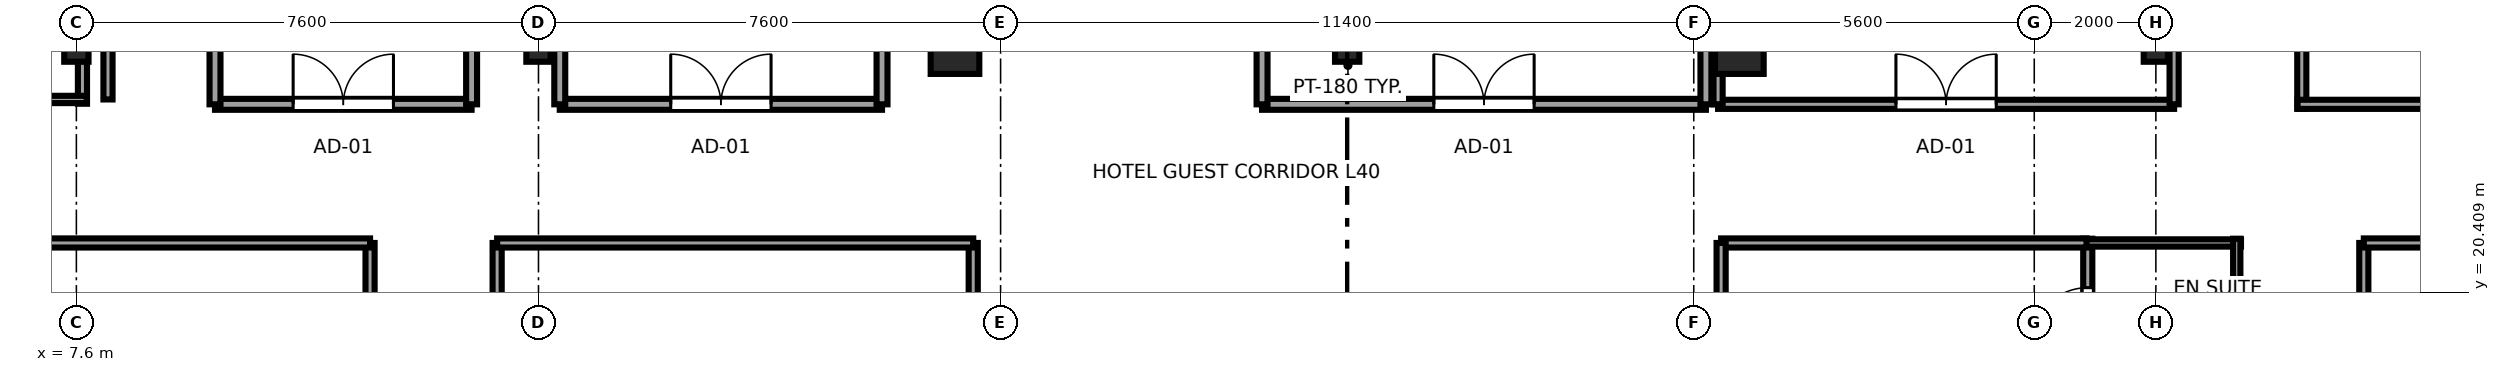
"""IFC4 building model, lengths in metres.
Left out: names, types, materials, properties, quantities, classifications, styles, units other than length and angle.
Written with IfcOpenShell. Run it as: python <this file> out.ifc"""

import sys

from ifc_helpers import new_model, si_unit, direction, frame, frame_2d, origin, origin_2d, place, context, subcontext, project, spatial, rectangle, i_section, extrude, source, transform, mapped, element, fill, save


model = new_model("IFC4")
c1 = context("Model", 3, precision=1e-05, world=origin(), true_north=direction((0.0, 1.0)))
c2 = subcontext(c1, "Body", "Model", "MODEL_VIEW")
j1 = project(units=[si_unit("LENGTHUNIT", "METRE"), si_unit("PLANEANGLEUNIT", "RADIAN")], contexts=[c1])
p1 = place(None, origin())
s1 = spatial("IfcSite", under=j1, at=p1, CompositionType="ELEMENT")
p2 = place(p1, origin())
s2 = spatial("IfcBuilding", under=s1, at=p2, CompositionType="ELEMENT")
p3 = place(p2, frame((0.0, 0.0, 154.15)))
s3 = spatial("IfcBuildingStorey", under=s2, at=p3, CompositionType="ELEMENT", Elevation=154.15)
m1 = source(origin(), c2, "Body", "SweptSolid", [
    extrude(i_section(OverallWidth=0.4, OverallDepth=0.4, WebThickness=0.02, FlangeThickness=0.035, at=origin_2d()), origin(), (0.0, 0.0, 1.0), 3.55),
])
for number, where, z_axis, x_axis in (
    (1, (7.6, 24.4, 0.0), (0.0, 0.0, 1.0), (1.0, 0.0, 0.0)),
    (2, (15.2, 24.4, 0.0), (0.0, 0.0, 1.0), (1.0, 0.0, 0.0)),
):
    element("IfcColumn", number, at=place(p3, frame(where, z_axis=z_axis, x_axis=x_axis)), inside=s3, PredefinedType="COLUMN", context=c2, shape_type="MappedRepresentation", body=[
        mapped(m1, transform((0.0, 0.0, 0.0), x_axis=(1.0, 0.0, 0.0), y_axis=(0.0, 1.0, 0.0), z_axis=(0.0, 0.0, 1.0), scale=1.0)),
    ])
m2 = source(origin(), c2, "Body", "SweptSolid", [
    extrude(rectangle(XDim=0.8, YDim=0.8, at=origin_2d()), origin(), (0.0, 0.0, 1.0), 3.55),
])
for number, where, z_axis, x_axis in (
    (3, (22.05, 24.4, 0.0), (0.0, 0.0, 1.0), (1.0, 0.0, 0.0)),
    (4, (34.95, 24.4, 0.0), (0.0, 0.0, 1.0), (1.0, 0.0, 0.0)),
):
    element("IfcColumn", number, at=place(p3, frame(where, z_axis=z_axis, x_axis=x_axis)), inside=s3, PredefinedType="COLUMN", context=c2, shape_type="MappedRepresentation", body=[
        mapped(m2, transform((0.0, 0.0, 0.0), x_axis=(1.0, 0.0, 0.0), y_axis=(0.0, 1.0, 0.0), z_axis=(0.0, 0.0, 1.0), scale=1.0)),
    ])
for number, where, z_axis, x_axis in (
    (5, (41.8, 24.4, 0.0), (0.0, 0.0, 1.0), (1.0, 0.0, 0.0)),
    (6, (28.5, 24.4, 0.0), (0.0, 0.0, 1.0), (1.0, 0.0, 0.0)),
):
    element("IfcColumn", number, at=place(p3, frame(where, z_axis=z_axis, x_axis=x_axis)), inside=s3, PredefinedType="COLUMN", context=c2, shape_type="MappedRepresentation", body=[
        mapped(m1, transform((0.0, 0.0, 0.0), x_axis=(1.0, 0.0, 0.0), y_axis=(0.0, 1.0, 0.0), z_axis=(0.0, 0.0, 1.0), scale=1.0)),
    ])
p4 = place(p3, frame((40.68, 18.9, 0.0), z_axis=(0.0, 0.0, 1.0), x_axis=(0.0, 1.0, 0.0)))
e7 = element("IfcWall", 7, at=p4, inside=s3, PredefinedType="PARTITIONING", context=c2, shape_type="SweptSolid", body=[
    extrude(rectangle(XDim=2.39, YDim=0.15, at=frame_2d((1.195, 0.0))), origin(), (0.0, 0.0, 1.0), 3.37),
])
p5 = place(p4, frame((0.665, 0.0, 0.0)))
e8 = element("IfcOpeningElement", 8, at=p5, cuts=e7, PredefinedType="OPENING", context=c2, shape_type="SweptSolid", body=[
    extrude(rectangle(XDim=0.92, YDim=2.01, at=frame_2d((0.46, 1.005))), frame((0.0, 0.085, 0.0), z_axis=(0.0, -1.0, 0.0), x_axis=(1.0, 0.0, 0.0)), (0.0, 0.0, 1.0), 0.17),
])
p6 = place(p3, frame((40.61, 21.22, 0.0), z_axis=(0.0, 0.0, 1.0), x_axis=(1.0, 0.0, 0.0)))
e9 = element("IfcWall", 9, at=p6, inside=s3, PredefinedType="PLUMBINGWALL", context=c2, shape_type="SweptSolid", body=[
    extrude(rectangle(XDim=2.59, YDim=0.12, at=frame_2d((1.295, 0.0))), origin(), (0.0, 0.0, 1.0), 3.37),
])
p7 = place(p3, frame((43.13, 18.9, 0.0), z_axis=(0.0, 0.0, 1.0), x_axis=(0.0, 1.0, 0.0)))
e10 = element("IfcWall", 10, at=p7, inside=s3, PredefinedType="PLUMBINGWALL", context=c2, shape_type="SweptSolid", body=[
    extrude(rectangle(XDim=2.39, YDim=0.12, at=frame_2d((1.195, 0.0))), origin(), (0.0, 0.0, 1.0), 3.37),
])
p8 = place(p3, frame((7.7, 23.51, 0.0), z_axis=(0.0, 0.0, 1.0), x_axis=(0.0, 1.0, 0.0)))
e11 = element("IfcWall", 11, at=p8, inside=s3, PredefinedType="PARTITIONING", context=c2, shape_type="SweptSolid", body=[
    extrude(rectangle(XDim=2.39, YDim=0.15, at=frame_2d((1.195, 0.0))), origin(), (0.0, 0.0, 1.0), 2.16),
])
p9 = place(p3, frame((5.48, 23.58, 0.0), z_axis=(0.0, 0.0, 1.0), x_axis=(1.0, 0.0, 0.0)))
e12 = element("IfcWall", 12, at=p9, inside=s3, PredefinedType="PLUMBINGWALL", context=c2, shape_type="SweptSolid", body=[
    extrude(rectangle(XDim=2.29, YDim=0.12, at=frame_2d((1.145, 0.0))), origin(), (0.0, 0.0, 1.0), 3.37),
])
p10 = place(p3, frame((12.43, 18.61, 0.0), z_axis=(0.0, 0.0, 1.0), x_axis=(0.0, 1.0, 0.0)))
e13 = element("IfcWall", 13, at=p10, inside=s3, PredefinedType="PARTITIONING", context=c2, shape_type="SweptSolid", body=[
    extrude(rectangle(XDim=2.61, YDim=0.15, at=frame_2d((1.305, 0.0))), origin(), (0.0, 0.0, 1.0), 3.37),
])
p11 = place(p10, frame((0.795, 0.0, 0.0)))
e14 = element("IfcOpeningElement", 14, at=p11, cuts=e13, PredefinedType="OPENING", context=c2, shape_type="SweptSolid", body=[
    extrude(rectangle(XDim=0.98, YDim=2.12, at=frame_2d((0.49, 1.06))), frame((0.0, 0.085, 0.0), z_axis=(0.0, -1.0, 0.0), x_axis=(1.0, 0.0, 0.0)), (0.0, 0.0, 1.0), 0.17),
])
p12 = place(p3, frame((2.9, 21.22, 0.0), z_axis=(0.0, 0.0, 1.0), x_axis=(1.0, 0.0, 0.0)))
e15 = element("IfcWall", 15, at=p12, inside=s3, PredefinedType="PARTITIONING", context=c2, shape_type="SweptSolid", body=[
    extrude(rectangle(XDim=9.53, YDim=0.15, at=frame_2d((4.765, 0.0))), origin(), (0.0, 0.0, 1.0), 3.37),
])
p13 = place(p3, frame((14.52, 14.61, 0.0), z_axis=(0.0, 0.0, 1.0), x_axis=(0.0, 1.0, 0.0)))
e16 = element("IfcWall", 16, at=p13, inside=s3, PredefinedType="PARTITIONING", context=c2, shape_type="SweptSolid", body=[
    extrude(rectangle(XDim=6.61, YDim=0.15, at=frame_2d((3.305, 0.0))), origin(), (0.0, 0.0, 1.0), 3.37),
])
p14 = place(p13, frame((2.795, 0.0, 0.0)))
e17 = element("IfcOpeningElement", 17, at=p14, cuts=e16, PredefinedType="OPENING", context=c2, shape_type="SweptSolid", body=[
    extrude(rectangle(XDim=0.98, YDim=2.12, at=frame_2d((0.49, 1.06))), frame((0.0, 0.085, 0.0), z_axis=(0.0, -1.0, 0.0), x_axis=(1.0, 0.0, 0.0)), (0.0, 0.0, 1.0), 0.17),
])
p15 = place(p3, frame((22.35, 12.28, 0.0), z_axis=(0.0, 0.0, 1.0), x_axis=(0.0, 1.0, 0.0)))
e18 = element("IfcWall", 18, at=p15, inside=s3, PredefinedType="PARTITIONING", context=c2, shape_type="SweptSolid", body=[
    extrude(rectangle(XDim=8.94, YDim=0.15, at=frame_2d((4.47, 0.0))), origin(), (0.0, 0.0, 1.0), 3.37),
])
p16 = place(p3, frame((14.52, 21.22, 0.0), z_axis=(0.0, 0.0, 1.0), x_axis=(1.0, 0.0, 0.0)))
e19 = element("IfcWall", 19, at=p16, inside=s3, PredefinedType="PARTITIONING", context=c2, shape_type="SweptSolid", body=[
    extrude(rectangle(XDim=7.83, YDim=0.15, at=frame_2d((3.915, 0.0))), origin(), (0.0, 0.0, 1.0), 3.37),
])
p17 = place(p3, frame((34.65, 21.22, 0.0), z_axis=(0.0, 0.0, 1.0), x_axis=(1.0, 0.0, 0.0)))
e20 = element("IfcWall", 20, at=p17, inside=s3, PredefinedType="PARTITIONING", context=c2, shape_type="SweptSolid", body=[
    extrude(rectangle(XDim=6.01, YDim=0.15, at=frame_2d((3.005, 0.0))), origin(), (0.0, 0.0, 1.0), 3.37),
])
p18 = place(p3, frame((34.65, 15.28, 0.0), z_axis=(0.0, 0.0, 1.0), x_axis=(0.0, 1.0, 0.0)))
e21 = element("IfcWall", 21, at=p18, inside=s3, PredefinedType="PARTITIONING", context=c2, shape_type="SweptSolid", body=[
    extrude(rectangle(XDim=5.94, YDim=0.15, at=frame_2d((2.97, 0.0))), origin(), (0.0, 0.0, 1.0), 3.37),
])
p19 = place(p3, frame((45.22, 18.61, 0.0), z_axis=(0.0, 0.0, 1.0), x_axis=(0.0, 1.0, 0.0)))
e22 = element("IfcWall", 22, at=p19, inside=s3, PredefinedType="PARTITIONING", context=c2, shape_type="SweptSolid", body=[
    extrude(rectangle(XDim=2.61, YDim=0.15, at=frame_2d((1.305, 0.0))), origin(), (0.0, 0.0, 1.0), 3.37),
])
p20 = place(p19, frame((0.795, 0.0, 0.0)))
e23 = element("IfcOpeningElement", 23, at=p20, cuts=e22, PredefinedType="OPENING", context=c2, shape_type="SweptSolid", body=[
    extrude(rectangle(XDim=0.98, YDim=2.12, at=frame_2d((0.49, 1.06))), frame((0.0, 0.085, 0.0), z_axis=(0.0, -1.0, 0.0), x_axis=(1.0, 0.0, 0.0)), (0.0, 0.0, 1.0), 0.17),
])
p21 = place(p3, frame((45.22, 21.22, 0.0), z_axis=(0.0, 0.0, 1.0), x_axis=(1.0, 0.0, 0.0)))
e24 = element("IfcWall", 24, at=p21, inside=s3, PredefinedType="PARTITIONING", context=c2, shape_type="SweptSolid", body=[
    extrude(rectangle(XDim=8.775, YDim=0.15, at=frame_2d((4.388, 0.0))), origin(), (0.0, 0.0, 1.0), 3.37),
])
p22 = place(p3, frame((8.12, 23.58, 0.0), z_axis=(0.0, 0.0, 1.0), x_axis=(0.0, 1.0, 0.0)))
e25 = element("IfcWall", 25, at=p22, inside=s3, PredefinedType="PARTITIONING", context=c2, shape_type="SweptSolid", body=[
    extrude(rectangle(XDim=10.74, YDim=0.15, at=frame_2d((5.37, 0.0))), origin(), (0.0, 0.0, 1.0), 3.37),
])
p23 = place(p22, frame((4.88, 0.0, 0.0)))
e26 = element("IfcOpeningElement", 26, at=p23, cuts=e25, PredefinedType="OPENING", context=c2, shape_type="SweptSolid", body=[
    extrude(rectangle(XDim=0.98, YDim=2.12, at=frame_2d((0.49, 1.06))), frame((0.0, 0.085, 0.0), z_axis=(0.0, -1.0, 0.0), x_axis=(1.0, 0.0, 0.0)), (0.0, 0.0, 1.0), 0.17),
])
p24 = place(p3, frame((44.2, 23.43, 0.0), z_axis=(0.0, 0.0, 1.0), x_axis=(0.0, 1.0, 0.0)))
e27 = element("IfcWall", 27, at=p24, inside=s3, PredefinedType="PARTITIONING", context=c2, shape_type="SweptSolid", body=[
    extrude(rectangle(XDim=3.74, YDim=0.15, at=frame_2d((1.87, 0.0))), origin(), (0.0, 0.0, 1.0), 3.37),
])
p25 = place(p24, frame((1.24, 0.0, 0.0)))
e28 = element("IfcOpeningElement", 28, at=p25, cuts=e27, PredefinedType="OPENING", context=c2, shape_type="SweptSolid", body=[
    extrude(rectangle(XDim=0.92, YDim=2.01, at=frame_2d((0.46, 1.005))), frame((0.0, 0.085, 0.0), z_axis=(0.0, -1.0, 0.0), x_axis=(1.0, 0.0, 0.0)), (0.0, 0.0, 1.0), 0.17),
])
p26 = place(p3, frame((44.13, 23.5, 0.0), z_axis=(0.0, 0.0, 1.0), x_axis=(1.0, 0.0, 0.0)))
e29 = element("IfcWall", 29, at=p26, inside=s3, PredefinedType="PARTITIONING", context=c2, shape_type="SweptSolid", body=[
    extrude(rectangle(XDim=4.54, YDim=0.15, at=frame_2d((2.27, 0.0))), origin(), (0.0, 0.0, 1.0), 3.37),
])
p27 = place(p3, frame((9.88, 23.5, 0.0), z_axis=(0.0, 0.0, 1.0), x_axis=(1.0, 0.0, 0.0)))
e30 = element("IfcWall", 30, at=p27, inside=s3, PredefinedType="PARTITIONING", context=c2, shape_type="SweptSolid", body=[
    extrude(rectangle(XDim=4.22, YDim=0.18, at=frame_2d((2.11, 0.0))), origin(), (0.0, 0.0, 1.0), 3.37),
])
p28 = place(p27, frame((1.285, 0.0, 0.0)))
e31 = element("IfcOpeningElement", 31, at=p28, cuts=e30, PredefinedType="OPENING", context=c2, shape_type="SweptSolid", body=[
    extrude(rectangle(XDim=1.65, YDim=2.15, at=frame_2d((0.825, 1.075))), frame((0.0, 0.1, 0.0), z_axis=(0.0, -1.0, 0.0), x_axis=(1.0, 0.0, 0.0)), (0.0, 0.0, 1.0), 0.2),
])
for number, where, z_axis, x_axis in (
    (32, (9.88, 23.5, 0.0), (0.0, 0.0, 1.0), (0.0, 1.0, 0.0)),
    (33, (14.1, 23.5, 0.0), (0.0, 0.0, 1.0), (0.0, 1.0, 0.0)),
):
    element("IfcWall", number, at=place(p3, frame(where, z_axis=z_axis, x_axis=x_axis)), inside=s3, PredefinedType="PARTITIONING", context=c2, shape_type="SweptSolid", body=[
        extrude(rectangle(XDim=6.25, YDim=0.18, at=frame_2d((3.125, 0.0))), origin(), (0.0, 0.0, 1.0), 3.37),
    ])
p29 = place(p3, frame((27.1, 23.5, 0.0), z_axis=(0.0, 0.0, 1.0), x_axis=(1.0, 0.0, 0.0)))
e34 = element("IfcWall", 34, at=p29, inside=s3, PredefinedType="PARTITIONING", context=c2, shape_type="SweptSolid", body=[
    extrude(rectangle(XDim=7.3, YDim=0.18, at=frame_2d((3.65, 0.0))), origin(), (0.0, 0.0, 1.0), 3.37),
])
p30 = place(p29, frame((2.825, 0.0, 0.0)))
e35 = element("IfcOpeningElement", 35, at=p30, cuts=e34, PredefinedType="OPENING", context=c2, shape_type="SweptSolid", body=[
    extrude(rectangle(XDim=1.65, YDim=2.15, at=frame_2d((0.825, 1.075))), frame((0.0, 0.1, 0.0), z_axis=(0.0, -1.0, 0.0), x_axis=(1.0, 0.0, 0.0)), (0.0, 0.0, 1.0), 0.2),
])
for number, where, z_axis, x_axis in (
    (36, (27.1, 23.5, 0.0), (0.0, 0.0, 1.0), (0.0, 1.0, 0.0)),
    (37, (34.4, 23.5, 0.0), (0.0, 0.0, 1.0), (0.0, 1.0, 0.0)),
):
    element("IfcWall", number, at=place(p3, frame(where, z_axis=z_axis, x_axis=x_axis)), inside=s3, PredefinedType="PARTITIONING", context=c2, shape_type="SweptSolid", body=[
        extrude(rectangle(XDim=6.3, YDim=0.18, at=frame_2d((3.15, 0.0))), origin(), (0.0, 0.0, 1.0), 3.37),
    ])
p31 = place(p3, frame((15.55, 23.5, 0.0), z_axis=(0.0, 0.0, 1.0), x_axis=(1.0, 0.0, 0.0)))
e38 = element("IfcWall", 38, at=p31, inside=s3, PredefinedType="PARTITIONING", context=c2, shape_type="SweptSolid", body=[
    extrude(rectangle(XDim=5.3, YDim=0.18, at=frame_2d((2.65, 0.0))), origin(), (0.0, 0.0, 1.0), 3.37),
])
p32 = place(p31, frame((1.825, 0.0, 0.0)))
e39 = element("IfcOpeningElement", 39, at=p32, cuts=e38, PredefinedType="OPENING", context=c2, shape_type="SweptSolid", body=[
    extrude(rectangle(XDim=1.65, YDim=2.15, at=frame_2d((0.825, 1.075))), frame((0.0, 0.1, 0.0), z_axis=(0.0, -1.0, 0.0), x_axis=(1.0, 0.0, 0.0)), (0.0, 0.0, 1.0), 0.2),
])
for number, where, z_axis, x_axis in (
    (40, (15.55, 23.5, 0.0), (0.0, 0.0, 1.0), (0.0, 1.0, 0.0)),
    (41, (20.85, 23.5, 0.0), (0.0, 0.0, 1.0), (0.0, 1.0, 0.0)),
):
    element("IfcWall", number, at=place(p3, frame(where, z_axis=z_axis, x_axis=x_axis)), inside=s3, PredefinedType="PARTITIONING", context=c2, shape_type="SweptSolid", body=[
        extrude(rectangle(XDim=6.3, YDim=0.18, at=frame_2d((3.15, 0.0))), origin(), (0.0, 0.0, 1.0), 3.37),
    ])
p33 = place(p3, frame((34.6, 23.5, 0.0), z_axis=(0.0, 0.0, 1.0), x_axis=(1.0, 0.0, 0.0)))
e42 = element("IfcWall", 42, at=p33, inside=s3, PredefinedType="PARTITIONING", context=c2, shape_type="SweptSolid", body=[
    extrude(rectangle(XDim=7.5, YDim=0.15, at=frame_2d((3.75, 0.0))), origin(), (0.0, 0.0, 1.0), 3.37),
])
p34 = place(p33, frame((2.925, 0.0, 0.0)))
e43 = element("IfcOpeningElement", 43, at=p34, cuts=e42, PredefinedType="OPENING", context=c2, shape_type="SweptSolid", body=[
    extrude(rectangle(XDim=1.65, YDim=2.15, at=frame_2d((0.825, 1.075))), frame((0.0, 0.085, 0.0), z_axis=(0.0, -1.0, 0.0), x_axis=(1.0, 0.0, 0.0)), (0.0, 0.0, 1.0), 0.17),
])
p35 = place(p3, frame((34.6, 23.5, 0.0), z_axis=(0.0, 0.0, 1.0), x_axis=(0.0, 1.0, 0.0)))
e44 = element("IfcWall", 44, at=p35, inside=s3, PredefinedType="PARTITIONING", context=c2, shape_type="SweptSolid", body=[
    extrude(rectangle(XDim=5.9, YDim=0.15, at=frame_2d((2.95, 0.0))), origin(), (0.0, 0.0, 1.0), 3.37),
])
p36 = place(p3, frame((42.1, 23.5, 0.0), z_axis=(0.0, 0.0, 1.0), x_axis=(0.0, 1.0, 0.0)))
e45 = element("IfcWall", 45, at=p36, inside=s3, PredefinedType="PARTITIONING", context=c2, shape_type="SweptSolid", body=[
    extrude(rectangle(XDim=5.9, YDim=0.15, at=frame_2d((2.95, 0.0))), origin(), (0.0, 0.0, 1.0), 2.16),
])
m3 = source(origin(), c2, "Body", "SweptSolid", [
    extrude(rectangle(XDim=0.92, YDim=2.01, at=frame_2d((0.46, 1.005))), frame((0.0, 0.025, 0.0), z_axis=(0.0, -1.0, 0.0), x_axis=(1.0, 0.0, 0.0)), (0.0, 0.0, 1.0), 0.05),
])
p37 = place(p5, origin())
e46 = element("IfcDoor", 46, at=p37, inside=s3, OperationType="SINGLE_SWING_LEFT", PredefinedType="DOOR", context=c2, shape_type="MappedRepresentation", body=[
    mapped(m3, transform((0.0, 0.0, 0.0), x_axis=(1.0, 0.0, 0.0), y_axis=(0.0, 1.0, 0.0), z_axis=(0.0, 0.0, 1.0), scale=1.0)),
])
fill(e8, e46)
m4 = source(origin(), c2, "Body", "SweptSolid", [
    extrude(rectangle(XDim=1.65, YDim=2.15, at=frame_2d((0.825, 1.075))), frame((0.0, 0.025, 0.0), z_axis=(0.0, -1.0, 0.0), x_axis=(1.0, 0.0, 0.0)), (0.0, 0.0, 1.0), 0.05),
])
p38 = place(p28, origin())
e47 = element("IfcDoor", 47, at=p38, inside=s3, OperationType="DOUBLE_DOOR_SINGLE_SWING", PredefinedType="DOOR", context=c2, shape_type="MappedRepresentation", body=[
    mapped(m4, transform((0.0, 0.0, 0.0), x_axis=(1.0, 0.0, 0.0), y_axis=(0.0, 1.0, 0.0), z_axis=(0.0, 0.0, 1.0), scale=1.0)),
])
fill(e31, e47)
p39 = place(p30, origin())
e48 = element("IfcDoor", 48, at=p39, inside=s3, OperationType="DOUBLE_DOOR_SINGLE_SWING", PredefinedType="DOOR", context=c2, shape_type="MappedRepresentation", body=[
    mapped(m4, transform((0.0, 0.0, 0.0), x_axis=(1.0, 0.0, 0.0), y_axis=(0.0, 1.0, 0.0), z_axis=(0.0, 0.0, 1.0), scale=1.0)),
])
fill(e35, e48)
p40 = place(p32, origin())
e49 = element("IfcDoor", 49, at=p40, inside=s3, OperationType="DOUBLE_DOOR_SINGLE_SWING", PredefinedType="DOOR", context=c2, shape_type="MappedRepresentation", body=[
    mapped(m4, transform((0.0, 0.0, 0.0), x_axis=(1.0, 0.0, 0.0), y_axis=(0.0, 1.0, 0.0), z_axis=(0.0, 0.0, 1.0), scale=1.0)),
])
fill(e39, e49)
p41 = place(p34, origin())
e50 = element("IfcDoor", 50, at=p41, inside=s3, OperationType="DOUBLE_DOOR_SINGLE_SWING", PredefinedType="DOOR", context=c2, shape_type="MappedRepresentation", body=[
    mapped(m4, transform((0.0, 0.0, 0.0), x_axis=(1.0, 0.0, 0.0), y_axis=(0.0, 1.0, 0.0), z_axis=(0.0, 0.0, 1.0), scale=1.0)),
])
fill(e43, e50)
save(model, sys.argv[1])
